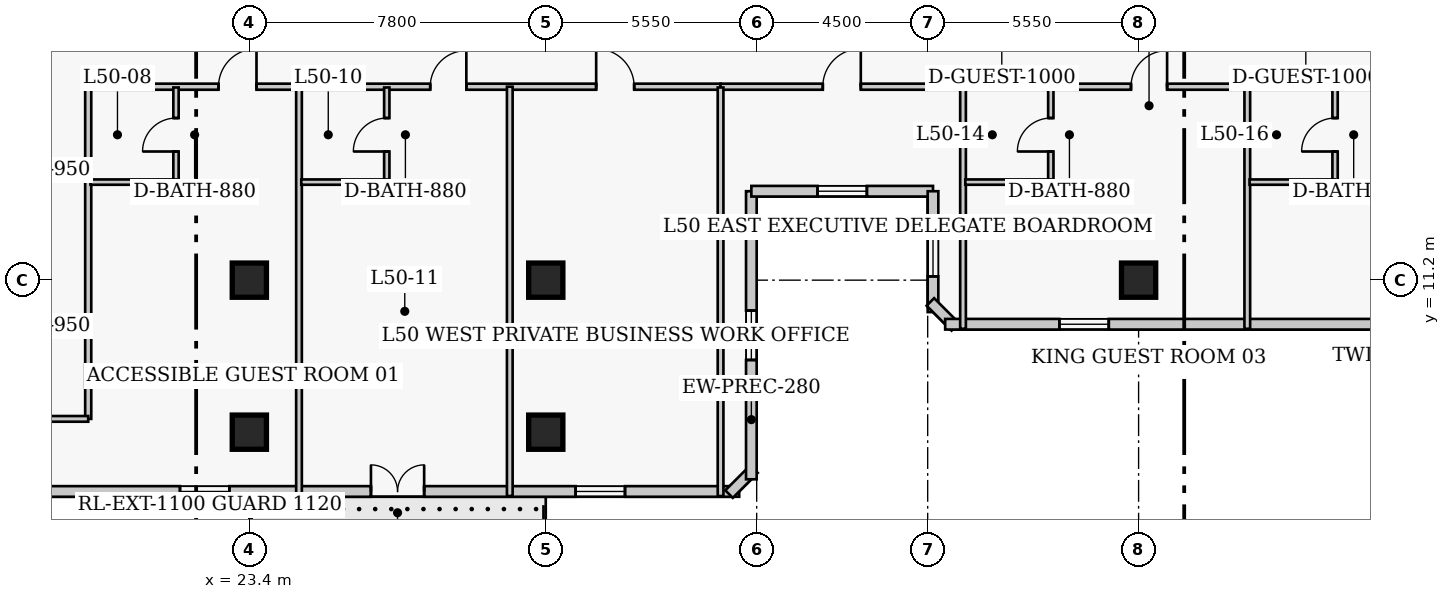
"""IFC4 building model, lengths in metres.
Left out: names, types, materials, properties, quantities, classifications, styles, units other than length and angle.
Written with IfcOpenShell. Run it as: python <this file> out.ifc"""

import sys

from ifc_helpers import new_model, si_unit, direction, frame, frame_2d, origin, origin_2d, place, context, subcontext, project, spatial, rectangle, extrude, element, fill, save


model = new_model("IFC4")
c1 = context("Model", 3, precision=1e-05, world=origin(), true_north=direction((0.0, 1.0)))
c2 = subcontext(c1, "Body", "Model", "MODEL_VIEW")
j1 = project(units=[si_unit("LENGTHUNIT", "METRE"), si_unit("PLANEANGLEUNIT", "RADIAN")], contexts=[c1])
p1 = place(None, origin())
s1 = spatial("IfcSite", under=j1, at=p1, CompositionType="ELEMENT")
p2 = place(p1, origin())
s2 = spatial("IfcBuilding", under=s1, at=p2, CompositionType="ELEMENT")
p3 = place(p2, frame((0.0, 0.0, 200.7)))
s3 = spatial("IfcBuildingStorey", under=s2, at=p3, CompositionType="ELEMENT", Elevation=200.7)
for number, where, z_axis, x_axis in (
    (1, (23.4, 11.2, 0.0), (0.0, 0.0, 1.0), (1.0, 0.0, 0.0)),
    (2, (31.2, 11.2, 0.0), (0.0, 0.0, 1.0), (1.0, 0.0, 0.0)),
    (3, (46.8, 11.2, 0.0), (0.0, 0.0, 1.0), (1.0, 0.0, 0.0)),
    (4, (23.4, 7.2, 0.0), (0.0, 0.0, 1.0), (1.0, 0.0, 0.0)),
    (5, (31.2, 7.2, 0.0), (0.0, 0.0, 1.0), (1.0, 0.0, 0.0)),
):
    element("IfcColumn", number, at=place(p3, frame(where, z_axis=z_axis, x_axis=x_axis)), inside=s3, PredefinedType="COLUMN", context=c2, shape_type="SweptSolid", body=[
        extrude(rectangle(XDim=0.9, YDim=0.9, at=origin_2d()), origin(), (0.0, 0.0, 1.0), 3.9),
    ])
p4 = place(p3, frame((10.46, 5.64, 0.0), z_axis=(0.0, 0.0, 1.0), x_axis=(1.0, 0.0, 0.0)))
e6 = element("IfcWall", 6, at=p4, inside=s3, PredefinedType="SOLIDWALL", context=c2, shape_type="SweptSolid", body=[
    extrude(rectangle(XDim=25.83, YDim=0.28, at=frame_2d((12.915, 0.0))), origin(), (0.0, 0.0, 1.0), 3.65),
])
p5 = place(p4, frame((16.14, 0.0, 0.0)))
e7 = element("IfcOpeningElement", 7, at=p5, cuts=e6, PredefinedType="OPENING", context=c2, shape_type="SweptSolid", body=[
    extrude(rectangle(XDim=1.4, YDim=2.15, at=frame_2d((0.7, 1.075))), frame((0.0, 0.15, 0.0), z_axis=(0.0, -1.0, 0.0), x_axis=(1.0, 0.0, 0.0)), (0.0, 0.0, 1.0), 0.3),
])
p6 = place(p4, frame((4.305, 0.0, 0.85)))
e8 = element("IfcOpeningElement", 8, at=p6, cuts=e6, PredefinedType="OPENING", context=c2, shape_type="SweptSolid", body=[
    extrude(rectangle(XDim=1.3, YDim=1.7, at=frame_2d((0.65, 0.85))), frame((0.0, 0.15, 0.0), z_axis=(0.0, -1.0, 0.0), x_axis=(1.0, 0.0, 0.0)), (0.0, 0.0, 1.0), 0.3),
])
p7 = place(p4, frame((11.115, 0.0, 0.85)))
e9 = element("IfcOpeningElement", 9, at=p7, cuts=e6, PredefinedType="OPENING", context=c2, shape_type="SweptSolid", body=[
    extrude(rectangle(XDim=1.3, YDim=1.7, at=frame_2d((0.65, 0.85))), frame((0.0, 0.15, 0.0), z_axis=(0.0, -1.0, 0.0), x_axis=(1.0, 0.0, 0.0)), (0.0, 0.0, 1.0), 0.3),
])
p8 = place(p4, frame((21.525, 0.0, 0.85)))
e10 = element("IfcOpeningElement", 10, at=p8, cuts=e6, PredefinedType="OPENING", context=c2, shape_type="SweptSolid", body=[
    extrude(rectangle(XDim=1.3, YDim=1.7, at=frame_2d((0.65, 0.85))), frame((0.0, 0.15, 0.0), z_axis=(0.0, -1.0, 0.0), x_axis=(1.0, 0.0, 0.0)), (0.0, 0.0, 1.0), 0.3),
])
p9 = place(p3, frame((36.023, 5.571, 0.0), z_axis=(0.0, 0.0, 1.0), x_axis=(0.707106781187, 0.707106781187, 0.0)))
e11 = element("IfcWall", 11, at=p9, inside=s3, PredefinedType="SOLIDWALL", context=c2, shape_type="SweptSolid", body=[
    extrude(rectangle(XDim=0.928, YDim=0.28, at=frame_2d((0.464, 0.0))), origin(), (0.0, 0.0, 1.0), 3.65),
])
p10 = place(p3, frame((36.61, 5.96, 0.0), z_axis=(0.0, 0.0, 1.0), x_axis=(0.0, 1.0, 0.0)))
e12 = element("IfcWall", 12, at=p10, inside=s3, PredefinedType="SOLIDWALL", context=c2, shape_type="SweptSolid", body=[
    extrude(rectangle(XDim=7.58, YDim=0.28, at=frame_2d((3.79, 0.0))), origin(), (0.0, 0.0, 1.0), 3.65),
])
p11 = place(p10, frame((3.14, 0.0, 0.85)))
e13 = element("IfcOpeningElement", 13, at=p11, cuts=e12, PredefinedType="OPENING", context=c2, shape_type="SweptSolid", body=[
    extrude(rectangle(XDim=1.3, YDim=1.7, at=frame_2d((0.65, 0.85))), frame((0.0, 0.15, 0.0), z_axis=(0.0, -1.0, 0.0), x_axis=(1.0, 0.0, 0.0)), (0.0, 0.0, 1.0), 0.3),
])
p12 = place(p3, frame((36.61, 13.54, 0.0), z_axis=(0.0, 0.0, 1.0), x_axis=(1.0, 0.0, 0.0)))
e14 = element("IfcWall", 14, at=p12, inside=s3, PredefinedType="SOLIDWALL", context=c2, shape_type="SweptSolid", body=[
    extrude(rectangle(XDim=4.78, YDim=0.28, at=frame_2d((2.39, 0.0))), origin(), (0.0, 0.0, 1.0), 3.65),
])
p13 = place(p12, frame((1.74, 0.0, 0.85)))
e15 = element("IfcOpeningElement", 15, at=p13, cuts=e14, PredefinedType="OPENING", context=c2, shape_type="SweptSolid", body=[
    extrude(rectangle(XDim=1.3, YDim=1.7, at=frame_2d((0.65, 0.85))), frame((0.0, 0.15, 0.0), z_axis=(0.0, -1.0, 0.0), x_axis=(1.0, 0.0, 0.0)), (0.0, 0.0, 1.0), 0.3),
])
p14 = place(p3, frame((41.39, 13.54, 0.0), z_axis=(0.0, 0.0, 1.0), x_axis=(0.0, -1.0, 0.0)))
e16 = element("IfcWall", 16, at=p14, inside=s3, PredefinedType="SOLIDWALL", context=c2, shape_type="SweptSolid", body=[
    extrude(rectangle(XDim=3.18, YDim=0.28, at=frame_2d((1.59, 0.0))), origin(), (0.0, 0.0, 1.0), 3.65),
])
p15 = place(p14, frame((0.94, 0.0, 0.85)))
e17 = element("IfcOpeningElement", 17, at=p15, cuts=e16, PredefinedType="OPENING", context=c2, shape_type="SweptSolid", body=[
    extrude(rectangle(XDim=1.3, YDim=1.7, at=frame_2d((0.65, 0.85))), frame((0.0, 0.15, 0.0), z_axis=(0.0, -1.0, 0.0), x_axis=(1.0, 0.0, 0.0)), (0.0, 0.0, 1.0), 0.3),
])
p16 = place(p3, frame((41.321, 10.627, 0.0), z_axis=(0.0, 0.0, 1.0), x_axis=(0.707106781187, -0.707106781187, 0.0)))
e18 = element("IfcWall", 18, at=p16, inside=s3, PredefinedType="SOLIDWALL", context=c2, shape_type="SweptSolid", body=[
    extrude(rectangle(XDim=0.928, YDim=0.28, at=frame_2d((0.464, 0.0))), origin(), (0.0, 0.0, 1.0), 3.65),
])
p17 = place(p3, frame((41.71, 10.04, 0.0), z_axis=(0.0, 0.0, 1.0), x_axis=(1.0, 0.0, 0.0)))
e19 = element("IfcWall", 19, at=p17, inside=s3, PredefinedType="SOLIDWALL", context=c2, shape_type="SweptSolid", body=[
    extrude(rectangle(XDim=25.83, YDim=0.28, at=frame_2d((12.915, 0.0))), origin(), (0.0, 0.0, 1.0), 3.65),
])
p18 = place(p17, frame((3.005, 0.0, 0.85)))
e20 = element("IfcOpeningElement", 20, at=p18, cuts=e19, PredefinedType="OPENING", context=c2, shape_type="SweptSolid", body=[
    extrude(rectangle(XDim=1.3, YDim=1.7, at=frame_2d((0.65, 0.85))), frame((0.0, 0.15, 0.0), z_axis=(0.0, -1.0, 0.0), x_axis=(1.0, 0.0, 0.0)), (0.0, 0.0, 1.0), 0.3),
])
p19 = place(p17, frame((13.415, 0.0, 0.85)))
e21 = element("IfcOpeningElement", 21, at=p19, cuts=e19, PredefinedType="OPENING", context=c2, shape_type="SweptSolid", body=[
    extrude(rectangle(XDim=1.3, YDim=1.7, at=frame_2d((0.65, 0.85))), frame((0.0, 0.15, 0.0), z_axis=(0.0, -1.0, 0.0), x_axis=(1.0, 0.0, 0.0)), (0.0, 0.0, 1.0), 0.3),
])
p20 = place(p17, frame((21.525, 0.0, 0.85)))
e22 = element("IfcOpeningElement", 22, at=p20, cuts=e19, PredefinedType="OPENING", context=c2, shape_type="SweptSolid", body=[
    extrude(rectangle(XDim=1.3, YDim=1.7, at=frame_2d((0.65, 0.85))), frame((0.0, 0.15, 0.0), z_axis=(0.0, -1.0, 0.0), x_axis=(1.0, 0.0, 0.0)), (0.0, 0.0, 1.0), 0.3),
])
p21 = place(p3, frame((19.1, 16.29, 0.0), z_axis=(0.0, 0.0, 1.0), x_axis=(1.0, 0.0, 0.0)))
e23 = element("IfcWall", 23, at=p21, inside=s3, PredefinedType="PARTITIONING", context=c2, shape_type="SweptSolid", body=[
    extrude(rectangle(XDim=16.7, YDim=0.16, at=frame_2d((8.35, 0.0))), origin(), (0.0, 0.0, 1.0), 3.65),
])
p22 = place(p21, frame((3.488, 0.0, 0.0)))
e24 = element("IfcOpeningElement", 24, at=p22, cuts=e23, PredefinedType="OPENING", context=c2, shape_type="SweptSolid", body=[
    extrude(rectangle(XDim=1.0, YDim=2.15, at=frame_2d((0.5, 1.075))), frame((0.0, 0.09, 0.0), z_axis=(0.0, -1.0, 0.0), x_axis=(1.0, 0.0, 0.0)), (0.0, 0.0, 1.0), 0.18),
])
p23 = place(p21, frame((9.06, 0.0, 0.0)))
e25 = element("IfcOpeningElement", 25, at=p23, cuts=e23, PredefinedType="OPENING", context=c2, shape_type="SweptSolid", body=[
    extrude(rectangle(XDim=0.95, YDim=2.1, at=frame_2d((0.475, 1.05))), frame((0.0, 0.09, 0.0), z_axis=(0.0, -1.0, 0.0), x_axis=(1.0, 0.0, 0.0)), (0.0, 0.0, 1.0), 0.18),
])
p24 = place(p21, frame((13.427, 0.0, 0.0)))
e26 = element("IfcOpeningElement", 26, at=p24, cuts=e23, PredefinedType="OPENING", context=c2, shape_type="SweptSolid", body=[
    extrude(rectangle(XDim=1.0, YDim=2.15, at=frame_2d((0.5, 1.075))), frame((0.0, 0.09, 0.0), z_axis=(0.0, -1.0, 0.0), x_axis=(1.0, 0.0, 0.0)), (0.0, 0.0, 1.0), 0.18),
])
p25 = place(p3, frame((35.8, 16.29, 0.0), z_axis=(0.0, 0.0, 1.0), x_axis=(1.0, 0.0, 0.0)))
e27 = element("IfcWall", 27, at=p25, inside=s3, PredefinedType="PARTITIONING", context=c2, shape_type="SweptSolid", body=[
    extrude(rectangle(XDim=22.5, YDim=0.16, at=frame_2d((11.25, 0.0))), origin(), (0.0, 0.0, 1.0), 3.65),
])
p26 = place(p25, frame((2.69, 0.0, 0.0)))
e28 = element("IfcOpeningElement", 28, at=p26, cuts=e27, PredefinedType="OPENING", context=c2, shape_type="SweptSolid", body=[
    extrude(rectangle(XDim=1.0, YDim=2.15, at=frame_2d((0.5, 1.075))), frame((0.0, 0.09, 0.0), z_axis=(0.0, -1.0, 0.0), x_axis=(1.0, 0.0, 0.0)), (0.0, 0.0, 1.0), 0.18),
])
p27 = place(p25, frame((10.8, 0.0, 0.0)))
e29 = element("IfcOpeningElement", 29, at=p27, cuts=e27, PredefinedType="OPENING", context=c2, shape_type="SweptSolid", body=[
    extrude(rectangle(XDim=0.95, YDim=2.1, at=frame_2d((0.475, 1.05))), frame((0.0, 0.09, 0.0), z_axis=(0.0, -1.0, 0.0), x_axis=(1.0, 0.0, 0.0)), (0.0, 0.0, 1.0), 0.18),
])
p28 = place(p25, frame((18.83, 0.0, 0.0)))
e30 = element("IfcOpeningElement", 30, at=p28, cuts=e27, PredefinedType="OPENING", context=c2, shape_type="SweptSolid", body=[
    extrude(rectangle(XDim=0.95, YDim=2.1, at=frame_2d((0.475, 1.05))), frame((0.0, 0.09, 0.0), z_axis=(0.0, -1.0, 0.0), x_axis=(1.0, 0.0, 0.0)), (0.0, 0.0, 1.0), 0.18),
])
p29 = place(p3, frame((19.16, 7.55, 0.0), z_axis=(0.0, 0.0, 1.0), x_axis=(0.0, 1.0, 0.0)))
e31 = element("IfcWall", 31, at=p29, inside=s3, PredefinedType="PARTITIONING", context=c2, shape_type="SweptSolid", body=[
    extrude(rectangle(XDim=8.74, YDim=0.16, at=frame_2d((4.37, 0.0))), origin(), (0.0, 0.0, 1.0), 3.65),
])
p30 = place(p3, frame((16.94, 7.55, 0.0), z_axis=(0.0, 0.0, 1.0), x_axis=(1.0, 0.0, 0.0)))
e32 = element("IfcWall", 32, at=p30, inside=s3, PredefinedType="PARTITIONING", context=c2, shape_type="SweptSolid", body=[
    extrude(rectangle(XDim=2.22, YDim=0.15, at=frame_2d((1.11, 0.0))), origin(), (0.0, 0.0, 1.0), 3.65),
])
p31 = place(p3, frame((21.47, 13.78, 0.0), z_axis=(0.0, 0.0, 1.0), x_axis=(0.0, 1.0, 0.0)))
e33 = element("IfcWall", 33, at=p31, inside=s3, PredefinedType="PLUMBINGWALL", context=c2, shape_type="SweptSolid", body=[
    extrude(rectangle(XDim=2.49, YDim=0.14, at=frame_2d((1.245, 0.0))), origin(), (0.0, 0.0, 1.0), 3.65),
])
p32 = place(p31, frame((0.805, 0.0, 0.0)))
e34 = element("IfcOpeningElement", 34, at=p32, cuts=e33, PredefinedType="OPENING", context=c2, shape_type="SweptSolid", body=[
    extrude(rectangle(XDim=0.88, YDim=2.05, at=frame_2d((0.44, 1.025))), frame((0.0, 0.08, 0.0), z_axis=(0.0, -1.0, 0.0), x_axis=(1.0, 0.0, 0.0)), (0.0, 0.0, 1.0), 0.16),
])
p33 = place(p3, frame((19.22, 13.78, 0.0), z_axis=(0.0, 0.0, 1.0), x_axis=(1.0, 0.0, 0.0)))
e35 = element("IfcWall", 35, at=p33, inside=s3, PredefinedType="PLUMBINGWALL", context=c2, shape_type="SweptSolid", body=[
    extrude(rectangle(XDim=2.25, YDim=0.14, at=frame_2d((1.125, 0.0))), origin(), (0.0, 0.0, 1.0), 3.65),
])
p34 = place(p3, frame((24.707, 5.52, 0.0), z_axis=(0.0, 0.0, 1.0), x_axis=(0.0, 1.0, 0.0)))
e36 = element("IfcWall", 36, at=p34, inside=s3, PredefinedType="PARTITIONING", context=c2, shape_type="SweptSolid", body=[
    extrude(rectangle(XDim=10.77, YDim=0.15, at=frame_2d((5.385, 0.0))), origin(), (0.0, 0.0, 1.0), 3.65),
])
p35 = place(p3, frame((27.017, 13.78, 0.0), z_axis=(0.0, 0.0, 1.0), x_axis=(0.0, 1.0, 0.0)))
e37 = element("IfcWall", 37, at=p35, inside=s3, PredefinedType="PLUMBINGWALL", context=c2, shape_type="SweptSolid", body=[
    extrude(rectangle(XDim=2.49, YDim=0.14, at=frame_2d((1.245, 0.0))), origin(), (0.0, 0.0, 1.0), 3.65),
])
p36 = place(p35, frame((0.805, 0.0, 0.0)))
e38 = element("IfcOpeningElement", 38, at=p36, cuts=e37, PredefinedType="OPENING", context=c2, shape_type="SweptSolid", body=[
    extrude(rectangle(XDim=0.88, YDim=2.05, at=frame_2d((0.44, 1.025))), frame((0.0, 0.08, 0.0), z_axis=(0.0, -1.0, 0.0), x_axis=(1.0, 0.0, 0.0)), (0.0, 0.0, 1.0), 0.16),
])
p37 = place(p3, frame((24.767, 13.78, 0.0), z_axis=(0.0, 0.0, 1.0), x_axis=(1.0, 0.0, 0.0)))
e39 = element("IfcWall", 39, at=p37, inside=s3, PredefinedType="PLUMBINGWALL", context=c2, shape_type="SweptSolid", body=[
    extrude(rectangle(XDim=2.25, YDim=0.14, at=frame_2d((1.125, 0.0))), origin(), (0.0, 0.0, 1.0), 3.65),
])
p38 = place(p3, frame((30.253, 5.52, 0.0), z_axis=(0.0, 0.0, 1.0), x_axis=(0.0, 1.0, 0.0)))
e40 = element("IfcWall", 40, at=p38, inside=s3, PredefinedType="PARTITIONING", context=c2, shape_type="SweptSolid", body=[
    extrude(rectangle(XDim=10.77, YDim=0.15, at=frame_2d((5.385, 0.0))), origin(), (0.0, 0.0, 1.0), 3.65),
])
p39 = place(p3, frame((35.8, 5.52, 0.0), z_axis=(0.0, 0.0, 1.0), x_axis=(0.0, 1.0, 0.0)))
e41 = element("IfcWall", 41, at=p39, inside=s3, PredefinedType="PARTITIONING", context=c2, shape_type="SweptSolid", body=[
    extrude(rectangle(XDim=10.75, YDim=0.15, at=frame_2d((5.375, 0.0))), origin(), (0.0, 0.0, 1.0), 3.65),
])
p40 = place(p3, frame((42.18, 9.92, 0.0), z_axis=(0.0, 0.0, 1.0), x_axis=(0.0, 1.0, 0.0)))
e42 = element("IfcWall", 42, at=p40, inside=s3, PredefinedType="PARTITIONING", context=c2, shape_type="SweptSolid", body=[
    extrude(rectangle(XDim=6.37, YDim=0.15, at=frame_2d((3.185, 0.0))), origin(), (0.0, 0.0, 1.0), 3.65),
])
p41 = place(p3, frame((44.49, 13.78, 0.0), z_axis=(0.0, 0.0, 1.0), x_axis=(0.0, 1.0, 0.0)))
e43 = element("IfcWall", 43, at=p41, inside=s3, PredefinedType="PLUMBINGWALL", context=c2, shape_type="SweptSolid", body=[
    extrude(rectangle(XDim=2.49, YDim=0.14, at=frame_2d((1.245, 0.0))), origin(), (0.0, 0.0, 1.0), 3.65),
])
p42 = place(p41, frame((0.805, 0.0, 0.0)))
e44 = element("IfcOpeningElement", 44, at=p42, cuts=e43, PredefinedType="OPENING", context=c2, shape_type="SweptSolid", body=[
    extrude(rectangle(XDim=0.88, YDim=2.05, at=frame_2d((0.44, 1.025))), frame((0.0, 0.08, 0.0), z_axis=(0.0, -1.0, 0.0), x_axis=(1.0, 0.0, 0.0)), (0.0, 0.0, 1.0), 0.16),
])
p43 = place(p3, frame((42.24, 13.78, 0.0), z_axis=(0.0, 0.0, 1.0), x_axis=(1.0, 0.0, 0.0)))
e45 = element("IfcWall", 45, at=p43, inside=s3, PredefinedType="PLUMBINGWALL", context=c2, shape_type="SweptSolid", body=[
    extrude(rectangle(XDim=2.25, YDim=0.14, at=frame_2d((1.125, 0.0))), origin(), (0.0, 0.0, 1.0), 3.65),
])
p44 = place(p3, frame((49.66, 9.92, 0.0), z_axis=(0.0, 0.0, 1.0), x_axis=(0.0, 1.0, 0.0)))
e46 = element("IfcWall", 46, at=p44, inside=s3, PredefinedType="PARTITIONING", context=c2, shape_type="SweptSolid", body=[
    extrude(rectangle(XDim=6.37, YDim=0.15, at=frame_2d((3.185, 0.0))), origin(), (0.0, 0.0, 1.0), 3.65),
])
p45 = place(p3, frame((51.97, 13.78, 0.0), z_axis=(0.0, 0.0, 1.0), x_axis=(0.0, 1.0, 0.0)))
e47 = element("IfcWall", 47, at=p45, inside=s3, PredefinedType="PLUMBINGWALL", context=c2, shape_type="SweptSolid", body=[
    extrude(rectangle(XDim=2.49, YDim=0.14, at=frame_2d((1.245, 0.0))), origin(), (0.0, 0.0, 1.0), 3.65),
])
p46 = place(p45, frame((0.805, 0.0, 0.0)))
e48 = element("IfcOpeningElement", 48, at=p46, cuts=e47, PredefinedType="OPENING", context=c2, shape_type="SweptSolid", body=[
    extrude(rectangle(XDim=0.88, YDim=2.05, at=frame_2d((0.44, 1.025))), frame((0.0, 0.08, 0.0), z_axis=(0.0, -1.0, 0.0), x_axis=(1.0, 0.0, 0.0)), (0.0, 0.0, 1.0), 0.16),
])
p47 = place(p3, frame((49.72, 13.78, 0.0), z_axis=(0.0, 0.0, 1.0), x_axis=(1.0, 0.0, 0.0)))
e49 = element("IfcWall", 49, at=p47, inside=s3, PredefinedType="PLUMBINGWALL", context=c2, shape_type="SweptSolid", body=[
    extrude(rectangle(XDim=2.25, YDim=0.14, at=frame_2d((1.125, 0.0))), origin(), (0.0, 0.0, 1.0), 3.65),
])
p48 = place(p5, origin())
e50 = element("IfcDoor", 50, at=p48, inside=s3, OperationType="DOUBLE_DOOR_SINGLE_SWING", PredefinedType="DOOR", context=c2, shape_type="SweptSolid", body=[
    extrude(rectangle(XDim=1.4, YDim=2.15, at=frame_2d((0.7, 1.075))), frame((0.0, 0.025, 0.0), z_axis=(0.0, -1.0, 0.0), x_axis=(1.0, 0.0, 0.0)), (0.0, 0.0, 1.0), 0.05),
])
fill(e7, e50)
p49 = place(p7, origin())
e51 = element("IfcWindow", 51, at=p49, inside=s3, PartitioningType="SINGLE_PANEL", PredefinedType="WINDOW", context=c2, shape_type="SweptSolid", body=[
    extrude(rectangle(XDim=1.3, YDim=1.7, at=frame_2d((0.65, 0.85))), frame((0.0, 0.03, 0.0), z_axis=(0.0, -1.0, 0.0), x_axis=(1.0, 0.0, 0.0)), (0.0, 0.0, 1.0), 0.06),
])
fill(e9, e51)
p50 = place(p8, origin())
e52 = element("IfcWindow", 52, at=p50, inside=s3, PartitioningType="SINGLE_PANEL", PredefinedType="WINDOW", context=c2, shape_type="SweptSolid", body=[
    extrude(rectangle(XDim=1.3, YDim=1.7, at=frame_2d((0.65, 0.85))), frame((0.0, 0.03, 0.0), z_axis=(0.0, -1.0, 0.0), x_axis=(1.0, 0.0, 0.0)), (0.0, 0.0, 1.0), 0.06),
])
fill(e10, e52)
p51 = place(p11, origin())
e53 = element("IfcWindow", 53, at=p51, inside=s3, PartitioningType="SINGLE_PANEL", PredefinedType="WINDOW", context=c2, shape_type="SweptSolid", body=[
    extrude(rectangle(XDim=1.3, YDim=1.7, at=frame_2d((0.65, 0.85))), frame((0.0, 0.03, 0.0), z_axis=(0.0, -1.0, 0.0), x_axis=(1.0, 0.0, 0.0)), (0.0, 0.0, 1.0), 0.06),
])
fill(e13, e53)
p52 = place(p13, origin())
e54 = element("IfcWindow", 54, at=p52, inside=s3, PartitioningType="SINGLE_PANEL", PredefinedType="WINDOW", context=c2, shape_type="SweptSolid", body=[
    extrude(rectangle(XDim=1.3, YDim=1.7, at=frame_2d((0.65, 0.85))), frame((0.0, 0.03, 0.0), z_axis=(0.0, -1.0, 0.0), x_axis=(1.0, 0.0, 0.0)), (0.0, 0.0, 1.0), 0.06),
])
fill(e15, e54)
p53 = place(p15, origin())
e55 = element("IfcWindow", 55, at=p53, inside=s3, PartitioningType="SINGLE_PANEL", PredefinedType="WINDOW", context=c2, shape_type="SweptSolid", body=[
    extrude(rectangle(XDim=1.3, YDim=1.7, at=frame_2d((0.65, 0.85))), frame((0.0, 0.03, 0.0), z_axis=(0.0, -1.0, 0.0), x_axis=(1.0, 0.0, 0.0)), (0.0, 0.0, 1.0), 0.06),
])
fill(e17, e55)
p54 = place(p18, origin())
e56 = element("IfcWindow", 56, at=p54, inside=s3, PartitioningType="SINGLE_PANEL", PredefinedType="WINDOW", context=c2, shape_type="SweptSolid", body=[
    extrude(rectangle(XDim=1.3, YDim=1.7, at=frame_2d((0.65, 0.85))), frame((0.0, 0.03, 0.0), z_axis=(0.0, -1.0, 0.0), x_axis=(1.0, 0.0, 0.0)), (0.0, 0.0, 1.0), 0.06),
])
fill(e20, e56)
p55 = place(p32, origin())
e57 = element("IfcDoor", 57, at=p55, inside=s3, OperationType="SINGLE_SWING_LEFT", PredefinedType="DOOR", context=c2, shape_type="SweptSolid", body=[
    extrude(rectangle(XDim=0.88, YDim=2.05, at=frame_2d((0.44, 1.025))), frame((0.0, 0.025, 0.0), z_axis=(0.0, -1.0, 0.0), x_axis=(1.0, 0.0, 0.0)), (0.0, 0.0, 1.0), 0.05),
])
fill(e34, e57)
p56 = place(p22, origin())
e58 = element("IfcDoor", 58, at=p56, inside=s3, OperationType="SINGLE_SWING_RIGHT", PredefinedType="DOOR", context=c2, shape_type="SweptSolid", body=[
    extrude(rectangle(XDim=1.0, YDim=2.15, at=frame_2d((0.5, 1.075))), frame((0.0, 0.025, 0.0), z_axis=(0.0, -1.0, 0.0), x_axis=(1.0, 0.0, 0.0)), (0.0, 0.0, 1.0), 0.05),
])
fill(e24, e58)
p57 = place(p36, origin())
e59 = element("IfcDoor", 59, at=p57, inside=s3, OperationType="SINGLE_SWING_LEFT", PredefinedType="DOOR", context=c2, shape_type="SweptSolid", body=[
    extrude(rectangle(XDim=0.88, YDim=2.05, at=frame_2d((0.44, 1.025))), frame((0.0, 0.025, 0.0), z_axis=(0.0, -1.0, 0.0), x_axis=(1.0, 0.0, 0.0)), (0.0, 0.0, 1.0), 0.05),
])
fill(e38, e59)
p58 = place(p23, origin())
e60 = element("IfcDoor", 60, at=p58, inside=s3, OperationType="SINGLE_SWING_RIGHT", PredefinedType="DOOR", context=c2, shape_type="SweptSolid", body=[
    extrude(rectangle(XDim=0.95, YDim=2.1, at=frame_2d((0.475, 1.05))), frame((0.0, 0.025, 0.0), z_axis=(0.0, -1.0, 0.0), x_axis=(1.0, 0.0, 0.0)), (0.0, 0.0, 1.0), 0.05),
])
fill(e25, e60)
p59 = place(p24, origin())
e61 = element("IfcDoor", 61, at=p59, inside=s3, OperationType="SINGLE_SWING_LEFT", PredefinedType="DOOR", context=c2, shape_type="SweptSolid", body=[
    extrude(rectangle(XDim=1.0, YDim=2.15, at=frame_2d((0.5, 1.075))), frame((0.0, 0.025, 0.0), z_axis=(0.0, -1.0, 0.0), x_axis=(1.0, 0.0, 0.0)), (0.0, 0.0, 1.0), 0.05),
])
fill(e26, e61)
p60 = place(p26, origin())
e62 = element("IfcDoor", 62, at=p60, inside=s3, OperationType="SINGLE_SWING_RIGHT", PredefinedType="DOOR", context=c2, shape_type="SweptSolid", body=[
    extrude(rectangle(XDim=1.0, YDim=2.15, at=frame_2d((0.5, 1.075))), frame((0.0, 0.025, 0.0), z_axis=(0.0, -1.0, 0.0), x_axis=(1.0, 0.0, 0.0)), (0.0, 0.0, 1.0), 0.05),
])
fill(e28, e62)
p61 = place(p42, origin())
e63 = element("IfcDoor", 63, at=p61, inside=s3, OperationType="SINGLE_SWING_LEFT", PredefinedType="DOOR", context=c2, shape_type="SweptSolid", body=[
    extrude(rectangle(XDim=0.88, YDim=2.05, at=frame_2d((0.44, 1.025))), frame((0.0, 0.025, 0.0), z_axis=(0.0, -1.0, 0.0), x_axis=(1.0, 0.0, 0.0)), (0.0, 0.0, 1.0), 0.05),
])
fill(e44, e63)
p62 = place(p27, origin())
e64 = element("IfcDoor", 64, at=p62, inside=s3, OperationType="SINGLE_SWING_RIGHT", PredefinedType="DOOR", context=c2, shape_type="SweptSolid", body=[
    extrude(rectangle(XDim=0.95, YDim=2.1, at=frame_2d((0.475, 1.05))), frame((0.0, 0.025, 0.0), z_axis=(0.0, -1.0, 0.0), x_axis=(1.0, 0.0, 0.0)), (0.0, 0.0, 1.0), 0.05),
])
fill(e29, e64)
p63 = place(p46, origin())
e65 = element("IfcDoor", 65, at=p63, inside=s3, OperationType="SINGLE_SWING_LEFT", PredefinedType="DOOR", context=c2, shape_type="SweptSolid", body=[
    extrude(rectangle(XDim=0.88, YDim=2.05, at=frame_2d((0.44, 1.025))), frame((0.0, 0.025, 0.0), z_axis=(0.0, -1.0, 0.0), x_axis=(1.0, 0.0, 0.0)), (0.0, 0.0, 1.0), 0.05),
])
fill(e48, e65)
save(model, sys.argv[1])
